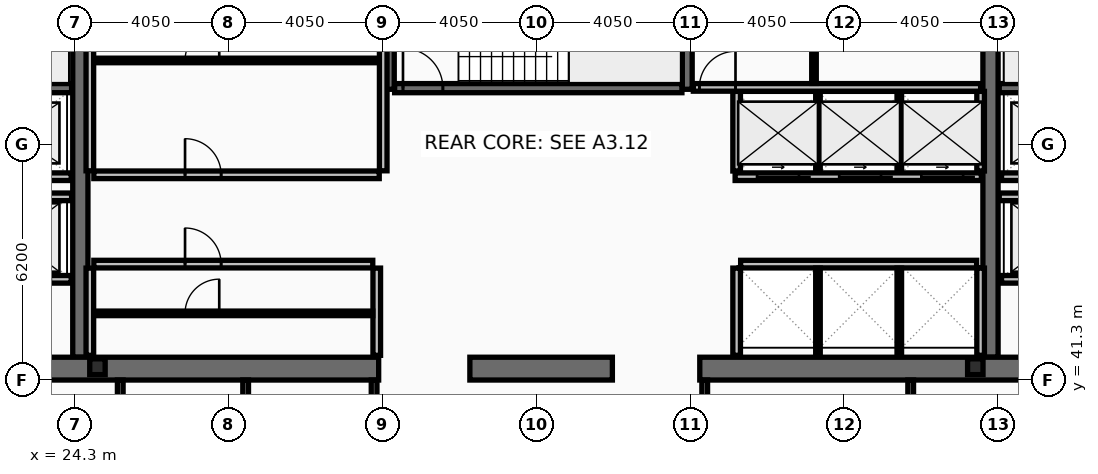
"""IFC4 building model, lengths in metres.
Left out: names, types, materials, properties, quantities, classifications, styles, units other than length and angle.
Written with IfcOpenShell. Run it as: python <this file> out.ifc"""

import sys

from ifc_helpers import new_model, si_unit, direction, frame, frame_2d, origin, origin_2d, place, context, subcontext, project, spatial, rectangle, i_section, extrude, element, fill, save


model = new_model("IFC4")
c1 = context("Model", 3, precision=1e-05, world=origin(), true_north=direction((0.0, 1.0)))
c2 = subcontext(c1, "Body", "Model", "MODEL_VIEW")
j1 = project(units=[si_unit("LENGTHUNIT", "METRE"), si_unit("PLANEANGLEUNIT", "RADIAN")], contexts=[c1])
p1 = place(None, origin())
s1 = spatial("IfcSite", under=j1, at=p1, CompositionType="ELEMENT")
p2 = place(p1, origin())
s2 = spatial("IfcBuilding", under=s1, at=p2, CompositionType="ELEMENT")
p3 = place(p2, frame((0.0, 0.0, 246.2)))
s3 = spatial("IfcBuildingStorey", under=s2, at=p3, CompositionType="ELEMENT", Elevation=246.2)
for number, where, z_axis, x_axis in (
    (1, (24.45, 41.9, 0.0), (0.0, 0.0, 1.0), (0.0, 1.0, 0.0)),
    (2, (48.4, 41.9, 0.0), (0.0, 0.0, 1.0), (0.0, 1.0, 0.0)),
):
    element("IfcWall", number, at=place(p3, frame(where, z_axis=z_axis, x_axis=x_axis)), inside=s3, PredefinedType="SHEAR", context=c2, shape_type="SweptSolid", body=[
        extrude(rectangle(XDim=11.2, YDim=0.4, at=frame_2d((5.6, 0.0))), origin(), (0.0, 0.0, 1.0), 3.44),
    ])
p4 = place(p3, frame((32.3, 41.6, 0.0), z_axis=(0.0, 0.0, 1.0), x_axis=(-1.0, 0.0, 0.0)))
e3 = element("IfcWall", 3, at=p4, inside=s3, PredefinedType="SHEAR", context=c2, shape_type="SweptSolid", body=[
    extrude(rectangle(XDim=11.45, YDim=0.6, at=frame_2d((5.725, 0.0))), origin(), (0.0, 0.0, 1.0), 3.44),
])
p5 = place(p3, frame((38.45, 41.6, 0.0), z_axis=(0.0, 0.0, 1.0), x_axis=(-1.0, 0.0, 0.0)))
e4 = element("IfcWall", 4, at=p5, inside=s3, PredefinedType="SHEAR", context=c2, shape_type="SweptSolid", body=[
    extrude(rectangle(XDim=3.75, YDim=0.6, at=frame_2d((1.875, 0.0))), origin(), (0.0, 0.0, 1.0), 3.44),
])
p6 = place(p3, frame((52.05, 41.6, 0.0), z_axis=(0.0, 0.0, 1.0), x_axis=(-1.0, 0.0, 0.0)))
e5 = element("IfcWall", 5, at=p6, inside=s3, PredefinedType="SHEAR", context=c2, shape_type="SweptSolid", body=[
    extrude(rectangle(XDim=11.3, YDim=0.6, at=frame_2d((5.65, 0.0))), origin(), (0.0, 0.0, 1.0), 3.44),
])
for number, where, z_axis, x_axis in (
    (6, (32.58, 48.95, 0.0), (0.0, 0.0, 1.0), (0.0, 1.0, 0.0)),
    (7, (40.42, 48.95, 0.0), (0.0, 0.0, 1.0), (0.0, 1.0, 0.0)),
):
    element("IfcWall", number, at=place(p3, frame(where, z_axis=z_axis, x_axis=x_axis)), inside=s3, PredefinedType="SHEAR", context=c2, shape_type="SweptSolid", body=[
        extrude(rectangle(XDim=4.15, YDim=0.26, at=frame_2d((2.075, 0.0))), origin(), (0.0, 0.0, 1.0), 3.44),
    ])
p7 = place(p3, frame((16.8, 48.98, 0.0), z_axis=(0.0, 0.0, 1.0), x_axis=(1.0, 0.0, 0.0)))
e8 = element("IfcWall", 8, at=p7, inside=s3, PredefinedType="SHEAR", context=c2, shape_type="SweptSolid", body=[
    extrude(rectangle(XDim=7.42, YDim=0.24, at=frame_2d((3.71, 0.0))), origin(), (0.0, 0.0, 1.0), 3.44),
])
p8 = place(p7, frame((0.22, 0.0, 0.0)))
e9 = element("IfcOpeningElement", 9, at=p8, cuts=e8, PredefinedType="OPENING", context=c2, shape_type="SweptSolid", body=[
    extrude(rectangle(XDim=1.05, YDim=2.15, at=frame_2d((0.525, 1.075))), frame((0.0, 0.13, 0.0), z_axis=(0.0, -1.0, 0.0), x_axis=(1.0, 0.0, 0.0)), (0.0, 0.0, 1.0), 0.26),
])
p9 = place(p3, frame((48.63, 48.98, 0.0), z_axis=(0.0, 0.0, 1.0), x_axis=(1.0, 0.0, 0.0)))
e10 = element("IfcWall", 10, at=p9, inside=s3, PredefinedType="SHEAR", context=c2, shape_type="SweptSolid", body=[
    extrude(rectangle(XDim=7.47, YDim=0.24, at=frame_2d((3.735, 0.0))), origin(), (0.0, 0.0, 1.0), 3.44),
])
p10 = place(p9, frame((6.2, 0.0, 0.0)))
e11 = element("IfcOpeningElement", 11, at=p10, cuts=e10, PredefinedType="OPENING", context=c2, shape_type="SweptSolid", body=[
    extrude(rectangle(XDim=1.05, YDim=2.15, at=frame_2d((0.525, 1.075))), frame((0.0, 0.13, 0.0), z_axis=(0.0, -1.0, 0.0), x_axis=(1.0, 0.0, 0.0)), (0.0, 0.0, 1.0), 0.26),
])
p11 = place(p3, frame((32.72, 48.98, 0.0), z_axis=(0.0, 0.0, 1.0), x_axis=(1.0, 0.0, 0.0)))
e12 = element("IfcWall", 12, at=p11, inside=s3, PredefinedType="SHEAR", context=c2, shape_type="SweptSolid", body=[
    extrude(rectangle(XDim=7.56, YDim=0.24, at=frame_2d((3.78, 0.0))), origin(), (0.0, 0.0, 1.0), 3.44),
])
p12 = place(p11, frame((0.22, 0.0, 0.0)))
e13 = element("IfcOpeningElement", 13, at=p12, cuts=e12, PredefinedType="OPENING", context=c2, shape_type="SweptSolid", body=[
    extrude(rectangle(XDim=1.05, YDim=2.15, at=frame_2d((0.525, 1.075))), frame((0.0, 0.13, 0.0), z_axis=(0.0, -1.0, 0.0), x_axis=(1.0, 0.0, 0.0)), (0.0, 0.0, 1.0), 0.26),
])
for number, where, z_axis, x_axis in (
    (14, (24.9, 41.65, 0.0), (0.0, 0.0, 1.0), (1.0, 0.0, 0.0)),
    (15, (48.0, 41.65, 0.0), (0.0, 0.0, 1.0), (1.0, 0.0, 0.0)),
):
    element("IfcColumn", number, at=place(p3, frame(where, z_axis=z_axis, x_axis=x_axis)), inside=s3, PredefinedType="COLUMN", context=c2, shape_type="SweptSolid", body=[
        extrude(i_section(OverallWidth=0.406, OverallDepth=0.416, WebThickness=0.03, FlangeThickness=0.048, at=origin_2d()), origin(), (0.0, 0.0, 1.0), 3.6),
    ])
p13 = place(p3, frame((51.61, 43.95, 0.0), z_axis=(0.0, 0.0, 1.0), x_axis=(-1.0, 0.0, 0.0)))
e16 = element("IfcWall", 16, at=p13, inside=s3, PredefinedType="PARTITIONING", context=c2, shape_type="SweptSolid", body=[
    extrude(rectangle(XDim=2.92, YDim=0.2, at=frame_2d((1.46, 0.0))), origin(), (0.0, 0.0, 1.0), 3.44),
])
p14 = place(p13, frame((0.81, 0.0, 0.0)))
e17 = element("IfcOpeningElement", 17, at=p14, cuts=e16, PredefinedType="OPENING", context=c2, shape_type="SweptSolid", body=[
    extrude(rectangle(XDim=1.3, YDim=2.18, at=frame_2d((0.65, 1.09))), frame((0.0, 0.11, 0.0), z_axis=(0.0, -1.0, 0.0), x_axis=(1.0, 0.0, 0.0)), (0.0, 0.0, 1.0), 0.22),
])
p15 = place(p3, frame((24.21, 43.95, 0.0), z_axis=(0.0, 0.0, 1.0), x_axis=(-1.0, 0.0, 0.0)))
e18 = element("IfcWall", 18, at=p15, inside=s3, PredefinedType="PARTITIONING", context=c2, shape_type="SweptSolid", body=[
    extrude(rectangle(XDim=2.97, YDim=0.2, at=frame_2d((1.485, 0.0))), origin(), (0.0, 0.0, 1.0), 3.44),
])
p16 = place(p15, frame((0.86, 0.0, 0.0)))
e19 = element("IfcOpeningElement", 19, at=p16, cuts=e18, PredefinedType="OPENING", context=c2, shape_type="SweptSolid", body=[
    extrude(rectangle(XDim=1.3, YDim=2.18, at=frame_2d((0.65, 1.09))), frame((0.0, 0.11, 0.0), z_axis=(0.0, -1.0, 0.0), x_axis=(1.0, 0.0, 0.0)), (0.0, 0.0, 1.0), 0.22),
])
p17 = place(p3, frame((51.61, 46.65, 0.0), z_axis=(0.0, 0.0, 1.0), x_axis=(-1.0, 0.0, 0.0)))
e20 = element("IfcWall", 20, at=p17, inside=s3, PredefinedType="PARTITIONING", context=c2, shape_type="SweptSolid", body=[
    extrude(rectangle(XDim=2.92, YDim=0.2, at=frame_2d((1.46, 0.0))), origin(), (0.0, 0.0, 1.0), 3.44),
])
p18 = place(p17, frame((0.86, 0.0, 0.0)))
e21 = element("IfcOpeningElement", 21, at=p18, cuts=e20, PredefinedType="OPENING", context=c2, shape_type="SweptSolid", body=[
    extrude(rectangle(XDim=1.2, YDim=2.18, at=frame_2d((0.6, 1.09))), frame((0.0, 0.11, 0.0), z_axis=(0.0, -1.0, 0.0), x_axis=(1.0, 0.0, 0.0)), (0.0, 0.0, 1.0), 0.22),
])
p19 = place(p3, frame((24.21, 46.65, 0.0), z_axis=(0.0, 0.0, 1.0), x_axis=(-1.0, 0.0, 0.0)))
e22 = element("IfcWall", 22, at=p19, inside=s3, PredefinedType="PARTITIONING", context=c2, shape_type="SweptSolid", body=[
    extrude(rectangle(XDim=2.97, YDim=0.2, at=frame_2d((1.485, 0.0))), origin(), (0.0, 0.0, 1.0), 3.44),
])
p20 = place(p19, frame((0.91, 0.0, 0.0)))
e23 = element("IfcOpeningElement", 23, at=p20, cuts=e22, PredefinedType="OPENING", context=c2, shape_type="SweptSolid", body=[
    extrude(rectangle(XDim=1.2, YDim=2.18, at=frame_2d((0.6, 1.09))), frame((0.0, 0.11, 0.0), z_axis=(0.0, -1.0, 0.0), x_axis=(1.0, 0.0, 0.0)), (0.0, 0.0, 1.0), 0.22),
])
p21 = place(p3, frame((48.16, 46.65, 0.0), z_axis=(0.0, 0.0, 1.0), x_axis=(-1.0, 0.0, 0.0)))
e24 = element("IfcWall", 24, at=p21, inside=s3, PredefinedType="PARTITIONING", context=c2, shape_type="SweptSolid", body=[
    extrude(rectangle(XDim=6.48, YDim=0.2, at=frame_2d((3.24, 0.0))), origin(), (0.0, 0.0, 1.0), 3.44),
])
p22 = place(p21, frame((4.8, 0.0, 0.0)))
e25 = element("IfcOpeningElement", 25, at=p22, cuts=e24, PredefinedType="OPENING", context=c2, shape_type="SweptSolid", body=[
    extrude(rectangle(XDim=1.1, YDim=2.18, at=frame_2d((0.55, 1.09))), frame((0.0, 0.11, 0.0), z_axis=(0.0, -1.0, 0.0), x_axis=(1.0, 0.0, 0.0)), (0.0, 0.0, 1.0), 0.22),
])
p23 = place(p21, frame((2.64, 0.0, 0.0)))
e26 = element("IfcOpeningElement", 26, at=p23, cuts=e24, PredefinedType="OPENING", context=c2, shape_type="SweptSolid", body=[
    extrude(rectangle(XDim=1.1, YDim=2.18, at=frame_2d((0.55, 1.09))), frame((0.0, 0.11, 0.0), z_axis=(0.0, -1.0, 0.0), x_axis=(1.0, 0.0, 0.0)), (0.0, 0.0, 1.0), 0.22),
])
p24 = place(p21, frame((0.48, 0.0, 0.0)))
e27 = element("IfcOpeningElement", 27, at=p24, cuts=e24, PredefinedType="OPENING", context=c2, shape_type="SweptSolid", body=[
    extrude(rectangle(XDim=1.1, YDim=2.18, at=frame_2d((0.55, 1.09))), frame((0.0, 0.11, 0.0), z_axis=(0.0, -1.0, 0.0), x_axis=(1.0, 0.0, 0.0)), (0.0, 0.0, 1.0), 0.22),
])
p25 = place(p3, frame((21.2, 46.12, 0.0), z_axis=(0.0, 0.0, 1.0), x_axis=(1.0, 0.0, 0.0)))
e28 = element("IfcWall", 28, at=p25, inside=s3, PredefinedType="PARTITIONING", context=c2, shape_type="SweptSolid", body=[
    extrude(rectangle(XDim=3.02, YDim=0.2, at=frame_2d((1.51, 0.0))), origin(), (0.0, 0.0, 1.0), 3.44),
])
p26 = place(p3, frame((48.63, 46.12, 0.0), z_axis=(0.0, 0.0, 1.0), x_axis=(1.0, 0.0, 0.0)))
e29 = element("IfcWall", 29, at=p26, inside=s3, PredefinedType="PARTITIONING", context=c2, shape_type="SweptSolid", body=[
    extrude(rectangle(XDim=3.07, YDim=0.2, at=frame_2d((1.535, 0.0))), origin(), (0.0, 0.0, 1.0), 3.44),
])
for number, where, z_axis, x_axis in (
    (30, (24.7, 46.805, 0.0), (0.0, 0.0, 1.0), (0.0, 1.0, 0.0)),
    (31, (32.42, 46.805, 0.0), (0.0, 0.0, 1.0), (0.0, 1.0, 0.0)),
):
    element("IfcWall", number, at=place(p3, frame(where, z_axis=z_axis, x_axis=x_axis)), inside=s3, PredefinedType="PARTITIONING", context=c2, shape_type="SweptSolid", body=[
        extrude(rectangle(XDim=5.99, YDim=0.2, at=frame_2d((2.995, 0.0))), origin(), (0.0, 0.0, 1.0), 3.44),
    ])
p27 = place(p3, frame((24.805, 49.709, 0.0), z_axis=(0.0, 0.0, 1.0), x_axis=(1.0, 0.0, 0.0)))
e32 = element("IfcWall", 32, at=p27, inside=s3, PredefinedType="PARTITIONING", context=c2, shape_type="SweptSolid", body=[
    extrude(rectangle(XDim=7.51, YDim=0.12, at=frame_2d((3.755, 0.0))), origin(), (0.0, 0.0, 1.0), 3.44),
])
p28 = place(p27, frame((2.4, 0.0, 0.0)))
e33 = element("IfcOpeningElement", 33, at=p28, cuts=e32, PredefinedType="OPENING", context=c2, shape_type="SweptSolid", body=[
    extrude(rectangle(XDim=0.9, YDim=2.05, at=frame_2d((0.45, 1.025))), frame((0.0, 0.07, 0.0), z_axis=(0.0, -1.0, 0.0), x_axis=(1.0, 0.0, 0.0)), (0.0, 0.0, 1.0), 0.14),
])
p29 = place(p3, frame((24.805, 46.7, 0.0), z_axis=(0.0, 0.0, 1.0), x_axis=(1.0, 0.0, 0.0)))
e34 = element("IfcWall", 34, at=p29, inside=s3, PredefinedType="PARTITIONING", context=c2, shape_type="SweptSolid", body=[
    extrude(rectangle(XDim=7.51, YDim=0.2, at=frame_2d((3.755, 0.0))), origin(), (0.0, 0.0, 1.0), 3.44),
])
p30 = place(p29, frame((2.4, 0.0, 0.0)))
e35 = element("IfcOpeningElement", 35, at=p30, cuts=e34, PredefinedType="OPENING", context=c2, shape_type="SweptSolid", body=[
    extrude(rectangle(XDim=0.95, YDim=2.1, at=frame_2d((0.475, 1.05))), frame((0.0, 0.11, 0.0), z_axis=(0.0, -1.0, 0.0), x_axis=(1.0, 0.0, 0.0)), (0.0, 0.0, 1.0), 0.22),
])
for number, where, z_axis, x_axis in (
    (36, (24.7, 41.95, 0.0), (0.0, 0.0, 1.0), (0.0, 1.0, 0.0)),
    (37, (32.25, 41.95, 0.0), (0.0, 0.0, 1.0), (0.0, 1.0, 0.0)),
):
    element("IfcWall", number, at=place(p3, frame(where, z_axis=z_axis, x_axis=x_axis)), inside=s3, PredefinedType="PARTITIONING", context=c2, shape_type="SweptSolid", body=[
        extrude(rectangle(XDim=2.295, YDim=0.2, at=frame_2d((1.147, 0.0))), origin(), (0.0, 0.0, 1.0), 3.44),
    ])
p31 = place(p3, frame((24.805, 43.054, 0.0), z_axis=(0.0, 0.0, 1.0), x_axis=(1.0, 0.0, 0.0)))
e38 = element("IfcWall", 38, at=p31, inside=s3, PredefinedType="PARTITIONING", context=c2, shape_type="SweptSolid", body=[
    extrude(rectangle(XDim=7.34, YDim=0.12, at=frame_2d((3.67, 0.0))), origin(), (0.0, 0.0, 1.0), 3.44),
])
p32 = place(p31, frame((2.4, 0.0, 0.0)))
e39 = element("IfcOpeningElement", 39, at=p32, cuts=e38, PredefinedType="OPENING", context=c2, shape_type="SweptSolid", body=[
    extrude(rectangle(XDim=0.9, YDim=2.05, at=frame_2d((0.45, 1.025))), frame((0.0, 0.07, 0.0), z_axis=(0.0, -1.0, 0.0), x_axis=(1.0, 0.0, 0.0)), (0.0, 0.0, 1.0), 0.14),
])
p33 = place(p3, frame((24.805, 44.35, 0.0), z_axis=(0.0, 0.0, 1.0), x_axis=(1.0, 0.0, 0.0)))
e40 = element("IfcWall", 40, at=p33, inside=s3, PredefinedType="PARTITIONING", context=c2, shape_type="SweptSolid", body=[
    extrude(rectangle(XDim=7.34, YDim=0.2, at=frame_2d((3.67, 0.0))), origin(), (0.0, 0.0, 1.0), 3.44),
])
p34 = place(p33, frame((2.4, 0.0, 0.0)))
e41 = element("IfcOpeningElement", 41, at=p34, cuts=e40, PredefinedType="OPENING", context=c2, shape_type="SweptSolid", body=[
    extrude(rectangle(XDim=0.95, YDim=2.1, at=frame_2d((0.475, 1.05))), frame((0.0, 0.11, 0.0), z_axis=(0.0, -1.0, 0.0), x_axis=(1.0, 0.0, 0.0)), (0.0, 0.0, 1.0), 0.22),
])
for number, where, z_axis, x_axis in (
    (42, (41.72, 46.8, 0.0), (0.0, 0.0, 1.0), (0.0, 1.0, 0.0)),
    (43, (48.14, 46.8, 0.0), (0.0, 0.0, 1.0), (0.0, 1.0, 0.0)),
):
    element("IfcWall", number, at=place(p3, frame(where, z_axis=z_axis, x_axis=x_axis)), inside=s3, PredefinedType="PARTITIONING", context=c2, shape_type="SweptSolid", body=[
        extrude(rectangle(XDim=2.095, YDim=0.2, at=frame_2d((1.047, 0.0))), origin(), (0.0, 0.0, 1.0), 3.44),
    ])
for number, where, z_axis, x_axis in (
    (44, (43.86, 46.8, 0.0), (0.0, 0.0, 1.0), (0.0, 1.0, 0.0)),
    (45, (46.0, 46.8, 0.0), (0.0, 0.0, 1.0), (0.0, 1.0, 0.0)),
):
    element("IfcWall", number, at=place(p3, frame(where, z_axis=z_axis, x_axis=x_axis)), inside=s3, PredefinedType="PARTITIONING", context=c2, shape_type="SweptSolid", body=[
        extrude(rectangle(XDim=2.095, YDim=0.12, at=frame_2d((1.047, 0.0))), origin(), (0.0, 0.0, 1.0), 3.44),
    ])
p35 = place(p3, frame((41.825, 44.35, 0.0), z_axis=(0.0, 0.0, 1.0), x_axis=(1.0, 0.0, 0.0)))
e46 = element("IfcWall", 46, at=p35, inside=s3, PredefinedType="PARTITIONING", context=c2, shape_type="SweptSolid", body=[
    extrude(rectangle(XDim=6.21, YDim=0.2, at=frame_2d((3.105, 0.0))), origin(), (0.0, 0.0, 1.0), 3.44),
])
for number, where, z_axis, x_axis in (
    (47, (41.72, 41.95, 0.0), (0.0, 0.0, 1.0), (0.0, 1.0, 0.0)),
    (48, (48.14, 41.95, 0.0), (0.0, 0.0, 1.0), (0.0, 1.0, 0.0)),
):
    element("IfcWall", number, at=place(p3, frame(where, z_axis=z_axis, x_axis=x_axis)), inside=s3, PredefinedType="PARTITIONING", context=c2, shape_type="SweptSolid", body=[
        extrude(rectangle(XDim=2.295, YDim=0.2, at=frame_2d((1.147, 0.0))), origin(), (0.0, 0.0, 1.0), 3.44),
    ])
for number, where, z_axis, x_axis in (
    (49, (43.86, 41.95, 0.0), (0.0, 0.0, 1.0), (0.0, 1.0, 0.0)),
    (50, (46.0, 41.95, 0.0), (0.0, 0.0, 1.0), (0.0, 1.0, 0.0)),
):
    element("IfcWall", number, at=place(p3, frame(where, z_axis=z_axis, x_axis=x_axis)), inside=s3, PredefinedType="PARTITIONING", context=c2, shape_type="SweptSolid", body=[
        extrude(rectangle(XDim=2.295, YDim=0.12, at=frame_2d((1.147, 0.0))), origin(), (0.0, 0.0, 1.0), 3.44),
    ])
p36 = place(p3, frame((40.58, 49.0, 0.0), z_axis=(0.0, 0.0, 1.0), x_axis=(1.0, 0.0, 0.0)))
e51 = element("IfcWall", 51, at=p36, inside=s3, PredefinedType="PARTITIONING", context=c2, shape_type="SweptSolid", body=[
    extrude(rectangle(XDim=7.56, YDim=0.2, at=frame_2d((3.78, 0.0))), origin(), (0.0, 0.0, 1.0), 3.44),
])
p37 = place(p36, frame((0.16, 0.0, 0.0)))
e52 = element("IfcOpeningElement", 52, at=p37, cuts=e51, PredefinedType="OPENING", context=c2, shape_type="SweptSolid", body=[
    extrude(rectangle(XDim=0.95, YDim=2.1, at=frame_2d((0.475, 1.05))), frame((0.0, 0.11, 0.0), z_axis=(0.0, -1.0, 0.0), x_axis=(1.0, 0.0, 0.0)), (0.0, 0.0, 1.0), 0.22),
])
p38 = place(p3, frame((43.755, 49.105, 0.0), z_axis=(0.0, 0.0, 1.0), x_axis=(0.0, 1.0, 0.0)))
e53 = element("IfcWall", 53, at=p38, inside=s3, PredefinedType="PARTITIONING", context=c2, shape_type="SweptSolid", body=[
    extrude(rectangle(XDim=3.69, YDim=0.12, at=frame_2d((1.845, 0.0))), origin(), (0.0, 0.0, 1.0), 3.44),
])
p39 = place(p38, frame((1.05, 0.0, 0.0)))
e54 = element("IfcOpeningElement", 54, at=p39, cuts=e53, PredefinedType="OPENING", context=c2, shape_type="SweptSolid", body=[
    extrude(rectangle(XDim=0.9, YDim=2.05, at=frame_2d((0.45, 1.025))), frame((0.0, 0.07, 0.0), z_axis=(0.0, -1.0, 0.0), x_axis=(1.0, 0.0, 0.0)), (0.0, 0.0, 1.0), 0.14),
])
for number, where, z_axis, x_axis in (
    (55, (25.5, 38.28, 0.0), (0.0, 0.0, 1.0), (0.0, 1.0, 0.0)),
    (56, (28.8, 38.28, 0.0), (0.0, 0.0, 1.0), (0.0, 1.0, 0.0)),
    (57, (32.18, 38.28, 0.0), (0.0, 0.0, 1.0), (0.0, 1.0, 0.0)),
    (58, (40.88, 38.28, 0.0), (0.0, 0.0, 1.0), (0.0, 1.0, 0.0)),
    (59, (46.3, 38.28, 0.0), (0.0, 0.0, 1.0), (0.0, 1.0, 0.0)),
):
    element("IfcWall", number, at=place(p3, frame(where, z_axis=z_axis, x_axis=x_axis)), inside=s3, PredefinedType="PARTITIONING", context=c2, shape_type="SweptSolid", body=[
        extrude(rectangle(XDim=3.02, YDim=0.15, at=frame_2d((1.51, 0.0))), origin(), (0.0, 0.0, 1.0), 3.44),
    ])
p40 = place(p12, origin())
e60 = element("IfcDoor", 60, at=p40, inside=s3, OperationType="SINGLE_SWING_LEFT", PredefinedType="DOOR", context=c2, shape_type="SweptSolid", body=[
    extrude(rectangle(XDim=1.05, YDim=2.15, at=frame_2d((0.525, 1.075))), frame((0.0, 0.025, 0.0), z_axis=(0.0, -1.0, 0.0), x_axis=(1.0, 0.0, 0.0)), (0.0, 0.0, 1.0), 0.05),
])
fill(e13, e60)
p41 = place(p22, origin())
e61 = element("IfcDoor", 61, at=p41, inside=s3, OperationType="SLIDING_TO_LEFT", PredefinedType="DOOR", context=c2, shape_type="SweptSolid", body=[
    extrude(rectangle(XDim=1.1, YDim=2.18, at=frame_2d((0.55, 1.09))), frame((0.0, 0.025, 0.0), z_axis=(0.0, -1.0, 0.0), x_axis=(1.0, 0.0, 0.0)), (0.0, 0.0, 1.0), 0.05),
])
fill(e25, e61)
p42 = place(p23, origin())
e62 = element("IfcDoor", 62, at=p42, inside=s3, OperationType="SLIDING_TO_LEFT", PredefinedType="DOOR", context=c2, shape_type="SweptSolid", body=[
    extrude(rectangle(XDim=1.1, YDim=2.18, at=frame_2d((0.55, 1.09))), frame((0.0, 0.025, 0.0), z_axis=(0.0, -1.0, 0.0), x_axis=(1.0, 0.0, 0.0)), (0.0, 0.0, 1.0), 0.05),
])
fill(e26, e62)
p43 = place(p24, origin())
e63 = element("IfcDoor", 63, at=p43, inside=s3, OperationType="SLIDING_TO_LEFT", PredefinedType="DOOR", context=c2, shape_type="SweptSolid", body=[
    extrude(rectangle(XDim=1.1, YDim=2.18, at=frame_2d((0.55, 1.09))), frame((0.0, 0.025, 0.0), z_axis=(0.0, -1.0, 0.0), x_axis=(1.0, 0.0, 0.0)), (0.0, 0.0, 1.0), 0.05),
])
fill(e27, e63)
p44 = place(p28, origin())
e64 = element("IfcDoor", 64, at=p44, inside=s3, OperationType="SINGLE_SWING_RIGHT", PredefinedType="DOOR", context=c2, shape_type="SweptSolid", body=[
    extrude(rectangle(XDim=0.9, YDim=2.05, at=frame_2d((0.45, 1.025))), frame((0.0, 0.025, 0.0), z_axis=(0.0, -1.0, 0.0), x_axis=(1.0, 0.0, 0.0)), (0.0, 0.0, 1.0), 0.05),
])
fill(e33, e64)
p45 = place(p30, origin())
e65 = element("IfcDoor", 65, at=p45, inside=s3, OperationType="SINGLE_SWING_LEFT", PredefinedType="DOOR", context=c2, shape_type="SweptSolid", body=[
    extrude(rectangle(XDim=0.95, YDim=2.1, at=frame_2d((0.475, 1.05))), frame((0.0, 0.025, 0.0), z_axis=(0.0, -1.0, 0.0), x_axis=(1.0, 0.0, 0.0)), (0.0, 0.0, 1.0), 0.05),
])
fill(e35, e65)
p46 = place(p32, origin())
e66 = element("IfcDoor", 66, at=p46, inside=s3, OperationType="SINGLE_SWING_RIGHT", PredefinedType="DOOR", context=c2, shape_type="SweptSolid", body=[
    extrude(rectangle(XDim=0.9, YDim=2.05, at=frame_2d((0.45, 1.025))), frame((0.0, 0.025, 0.0), z_axis=(0.0, -1.0, 0.0), x_axis=(1.0, 0.0, 0.0)), (0.0, 0.0, 1.0), 0.05),
])
fill(e39, e66)
p47 = place(p34, origin())
e67 = element("IfcDoor", 67, at=p47, inside=s3, OperationType="SINGLE_SWING_LEFT", PredefinedType="DOOR", context=c2, shape_type="SweptSolid", body=[
    extrude(rectangle(XDim=0.95, YDim=2.1, at=frame_2d((0.475, 1.05))), frame((0.0, 0.025, 0.0), z_axis=(0.0, -1.0, 0.0), x_axis=(1.0, 0.0, 0.0)), (0.0, 0.0, 1.0), 0.05),
])
fill(e41, e67)
p48 = place(p37, origin())
e68 = element("IfcDoor", 68, at=p48, inside=s3, OperationType="SINGLE_SWING_RIGHT", PredefinedType="DOOR", context=c2, shape_type="SweptSolid", body=[
    extrude(rectangle(XDim=0.95, YDim=2.1, at=frame_2d((0.475, 1.05))), frame((0.0, 0.025, 0.0), z_axis=(0.0, -1.0, 0.0), x_axis=(1.0, 0.0, 0.0)), (0.0, 0.0, 1.0), 0.05),
])
fill(e52, e68)
save(model, sys.argv[1])
